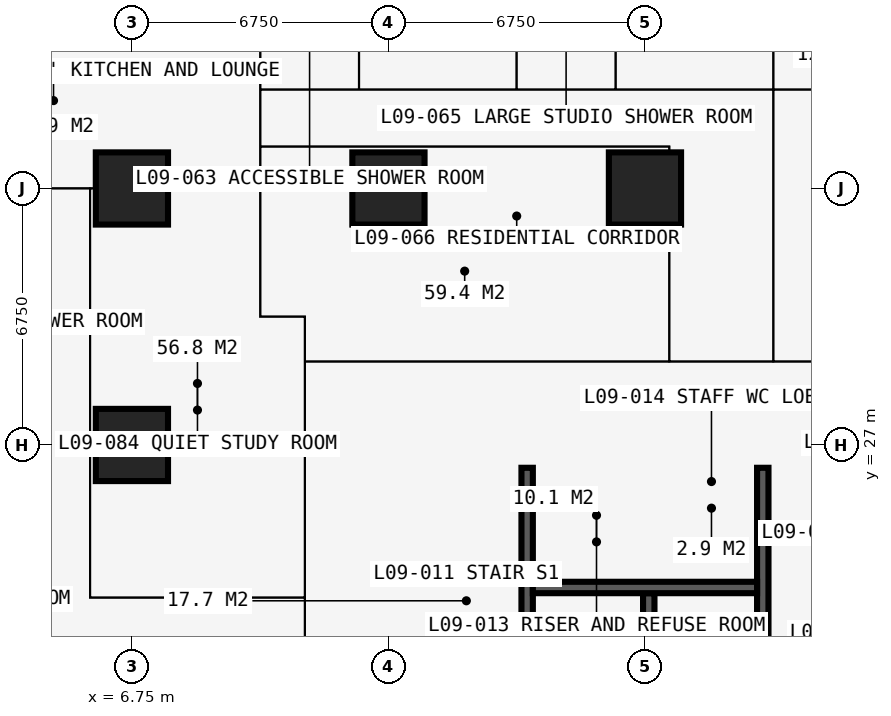
"""IFC4 building model, lengths in metres.
Left out: names, types, materials, properties, quantities, classifications, styles, units other than length and angle.
Written with IfcOpenShell. Run it as: python <this file> out.ifc"""

import sys

from ifc_helpers import new_model, si_unit, direction, frame, frame_2d, origin, origin_2d, place, context, subcontext, project, spatial, rectangle, extrude, element, fill, save


model = new_model("IFC4")
c1 = context("Model", 3, precision=1e-05, world=origin(), true_north=direction((0.0, 1.0)))
c2 = subcontext(c1, "Body", "Model", "MODEL_VIEW")
j1 = project(units=[si_unit("LENGTHUNIT", "METRE"), si_unit("PLANEANGLEUNIT", "RADIAN")], contexts=[c1])
p1 = place(None, origin())
s1 = spatial("IfcSite", under=j1, at=p1, CompositionType="ELEMENT")
p2 = place(p1, origin())
s2 = spatial("IfcBuilding", under=s1, at=p2, CompositionType="ELEMENT")
p3 = place(p2, frame((0.0, 0.0, 36.0)))
s3 = spatial("IfcBuildingStorey", under=s2, at=p3, CompositionType="ELEMENT", Elevation=36.0)
for number, where, z_axis, x_axis in (
    (1, (6.75, 27.0, 0.0), (0.0, 0.0, 1.0), (1.0, 0.0, 0.0)),
    (2, (6.75, 33.75, 0.0), (0.0, 0.0, 1.0), (1.0, 0.0, 0.0)),
    (3, (13.5, 33.75, 0.0), (0.0, 0.0, 1.0), (1.0, 0.0, 0.0)),
    (4, (20.25, 33.75, 0.0), (0.0, 0.0, 1.0), (1.0, 0.0, 0.0)),
):
    element("IfcColumn", number, at=place(p3, frame(where, z_axis=z_axis, x_axis=x_axis)), inside=s3, PredefinedType="COLUMN", context=c2, shape_type="SweptSolid", body=[
        extrude(rectangle(XDim=1.9, YDim=1.9, at=origin_2d()), origin(), (0.0, 0.0, 1.0), 3.6),
    ])
p4 = place(p3, frame((27.6, 27.0, 0.0), z_axis=(0.0, 0.0, 1.0), x_axis=(-1.0, 0.0, 0.0)))
e5 = element("IfcWall", 5, at=p4, inside=s3, PredefinedType="SHEAR", context=c2, shape_type="SweptSolid", body=[
    extrude(rectangle(XDim=14.7, YDim=1.2, at=frame_2d((7.35, 0.0))), origin(), (0.0, 0.0, 1.0), 3.6),
])
p5 = place(p4, frame((4.55, 0.0, 0.0)))
e6 = element("IfcOpeningElement", 6, at=p5, cuts=e5, PredefinedType="OPENING", context=c2, shape_type="SweptSolid", body=[
    extrude(rectangle(XDim=0.9, YDim=2.2, at=frame_2d((0.45, 1.1))), frame((0.0, 0.61, 0.0), z_axis=(0.0, -1.0, 0.0), x_axis=(1.0, 0.0, 0.0)), (0.0, 0.0, 1.0), 1.22),
])
p6 = place(p4, frame((7.525, 0.0, 0.0)))
e7 = element("IfcOpeningElement", 7, at=p6, cuts=e5, PredefinedType="OPENING", context=c2, shape_type="SweptSolid", body=[
    extrude(rectangle(XDim=1.0, YDim=2.2, at=frame_2d((0.5, 1.1))), frame((0.0, 0.61, 0.0), z_axis=(0.0, -1.0, 0.0), x_axis=(1.0, 0.0, 0.0)), (0.0, 0.0, 1.0), 1.22),
])
p7 = place(p3, frame((13.5, 26.4, 0.0), z_axis=(0.0, 0.0, 1.0), x_axis=(0.0, -1.0, 0.0)))
e8 = element("IfcWall", 8, at=p7, inside=s3, PredefinedType="SHEAR", context=c2, shape_type="SweptSolid", body=[
    extrude(rectangle(XDim=12.3, YDim=1.2, at=frame_2d((6.15, 0.0))), origin(), (0.0, 0.0, 1.0), 3.6),
])
p8 = place(p7, frame((7.45, 0.0, 0.0)))
e9 = element("IfcOpeningElement", 9, at=p8, cuts=e8, PredefinedType="OPENING", context=c2, shape_type="SweptSolid", body=[
    extrude(rectangle(XDim=1.2, YDim=2.2, at=frame_2d((0.6, 1.1))), frame((0.0, 0.61, 0.0), z_axis=(0.0, -1.0, 0.0), x_axis=(1.0, 0.0, 0.0)), (0.0, 0.0, 1.0), 1.22),
])
for number, where, z_axis, x_axis in (
    (10, (17.15, 20.3, 0.0), (0.0, 0.0, 1.0), (0.0, 1.0, 0.0)),
    (11, (23.35, 20.3, 0.0), (0.0, 0.0, 1.0), (0.0, 1.0, 0.0)),
):
    element("IfcWall", number, at=place(p3, frame(where, z_axis=z_axis, x_axis=x_axis)), inside=s3, PredefinedType="SHEAR", context=c2, shape_type="SweptSolid", body=[
        extrude(rectangle(XDim=6.1, YDim=0.3, at=frame_2d((3.05, 0.0))), origin(), (0.0, 0.0, 1.0), 3.6),
    ])
p9 = place(p3, frame((20.35, 20.3, 0.0), z_axis=(0.0, 0.0, 1.0), x_axis=(0.0, 1.0, 0.0)))
e12 = element("IfcWall", 12, at=p9, inside=s3, PredefinedType="SHEAR", context=c2, shape_type="SweptSolid", body=[
    extrude(rectangle(XDim=2.8, YDim=0.3, at=frame_2d((1.4, 0.0))), origin(), (0.0, 0.0, 1.0), 3.6),
])
p10 = place(p3, frame((17.3, 23.25, 0.0), z_axis=(0.0, 0.0, 1.0), x_axis=(1.0, 0.0, 0.0)))
e13 = element("IfcWall", 13, at=p10, inside=s3, PredefinedType="SHEAR", context=c2, shape_type="SweptSolid", body=[
    extrude(rectangle(XDim=5.9, YDim=0.3, at=frame_2d((2.95, 0.0))), origin(), (0.0, 0.0, 1.0), 3.6),
])
p11 = place(p3, frame((20.725, 23.4, 0.0), z_axis=(0.0, 0.0, 1.0), x_axis=(0.0, 1.0, 0.0)))
e14 = element("IfcWall", 14, at=p11, inside=s3, PredefinedType="PARTITIONING", context=c2, shape_type="SweptSolid", body=[
    extrude(rectangle(XDim=3.0, YDim=0.15, at=frame_2d((1.5, 0.0))), origin(), (0.0, 0.0, 1.0), 3.375),
])
p12 = place(p3, frame((20.8, 25.1, 0.0), z_axis=(0.0, 0.0, 1.0), x_axis=(1.0, 0.0, 0.0)))
e15 = element("IfcWall", 15, at=p12, inside=s3, PredefinedType="PARTITIONING", context=c2, shape_type="SweptSolid", body=[
    extrude(rectangle(XDim=2.4, YDim=0.15, at=frame_2d((1.2, 0.0))), origin(), (0.0, 0.0, 1.0), 3.375),
])
p13 = place(p12, frame((0.75, 0.0, 0.0)))
e16 = element("IfcOpeningElement", 16, at=p13, cuts=e15, PredefinedType="OPENING", context=c2, shape_type="SweptSolid", body=[
    extrude(rectangle(XDim=0.9, YDim=2.2, at=frame_2d((0.45, 1.1))), frame((0.0, 0.085, 0.0), z_axis=(0.0, -1.0, 0.0), x_axis=(1.0, 0.0, 0.0)), (0.0, 0.0, 1.0), 0.17),
])
p14 = place(p3, frame((4.15, 33.75, 0.0), z_axis=(0.0, 0.0, 1.0), x_axis=(1.0, 0.0, 0.0)))
e17 = element("IfcWall", 17, at=p14, inside=s3, PredefinedType="PARTITIONING", context=c2, shape_type="SweptSolid", body=[
    extrude(rectangle(XDim=5.975, YDim=0.15, at=frame_2d((2.988, 0.0))), origin(), (0.0, 0.0, 1.0), 2.877),
])
p15 = place(p3, frame((5.65, 22.988, 0.0), z_axis=(0.0, 0.0, 1.0), x_axis=(0.0, 1.0, 0.0)))
e18 = element("IfcWall", 18, at=p15, inside=s3, PredefinedType="PARTITIONING", context=c2, shape_type="SweptSolid", body=[
    extrude(rectangle(XDim=10.762, YDim=0.15, at=frame_2d((5.381, 0.0))), origin(), (0.0, 0.0, 1.0), 3.375),
])
p16 = place(p15, frame((5.0, 0.0, 0.0)))
e19 = element("IfcOpeningElement", 19, at=p16, cuts=e18, PredefinedType="OPENING", context=c2, shape_type="SweptSolid", body=[
    extrude(rectangle(XDim=0.95, YDim=2.2, at=frame_2d((0.475, 1.1))), frame((0.0, 0.085, 0.0), z_axis=(0.0, -1.0, 0.0), x_axis=(1.0, 0.0, 0.0)), (0.0, 0.0, 1.0), 0.17),
])
p17 = place(p3, frame((5.65, 22.988, 0.0), z_axis=(0.0, 0.0, 1.0), x_axis=(1.0, 0.0, 0.0)))
e20 = element("IfcWall", 20, at=p17, inside=s3, PredefinedType="PARTITIONING", context=c2, shape_type="SweptSolid", body=[
    extrude(rectangle(XDim=5.65, YDim=0.15, at=frame_2d((2.825, 0.0))), origin(), (0.0, 0.0, 1.0), 3.375),
])
p18 = place(p3, frame((10.125, 30.375, 0.0), z_axis=(0.0, 0.0, 1.0), x_axis=(0.0, 1.0, 0.0)))
e21 = element("IfcWall", 21, at=p18, inside=s3, PredefinedType="PARTITIONING", context=c2, shape_type="SweptSolid", body=[
    extrude(rectangle(XDim=10.859, YDim=0.15, at=frame_2d((5.429, 0.0))), origin(), (0.0, 0.0, 1.0), 3.375),
])
p19 = place(p18, frame((4.725, 0.0, 0.0)))
e22 = element("IfcOpeningElement", 22, at=p19, cuts=e21, PredefinedType="OPENING", context=c2, shape_type="SweptSolid", body=[
    extrude(rectangle(XDim=1.0, YDim=2.2, at=frame_2d((0.5, 1.1))), frame((0.0, 0.085, 0.0), z_axis=(0.0, -1.0, 0.0), x_axis=(1.0, 0.0, 0.0)), (0.0, 0.0, 1.0), 0.17),
])
p20 = place(p3, frame((10.125, 30.375, 0.0), z_axis=(0.0, 0.0, 1.0), x_axis=(1.0, 0.0, 0.0)))
e23 = element("IfcWall", 23, at=p20, inside=s3, PredefinedType="PARTITIONING", context=c2, shape_type="SweptSolid", body=[
    extrude(rectangle(XDim=1.175, YDim=0.15, at=frame_2d((0.587, 0.0))), origin(), (0.0, 0.0, 1.0), 3.375),
])
p21 = place(p3, frame((10.125, 34.85, 0.0), z_axis=(0.0, 0.0, 1.0), x_axis=(1.0, 0.0, 0.0)))
e24 = element("IfcWall", 24, at=p21, inside=s3, PredefinedType="PARTITIONING", context=c2, shape_type="SweptSolid", body=[
    extrude(rectangle(XDim=10.762, YDim=0.15, at=frame_2d((5.381, 0.0))), origin(), (0.0, 0.0, 1.0), 3.375),
])
p22 = place(p21, frame((4.9, 0.0, 0.0)))
e25 = element("IfcOpeningElement", 25, at=p22, cuts=e24, PredefinedType="OPENING", context=c2, shape_type="SweptSolid", body=[
    extrude(rectangle(XDim=0.95, YDim=2.2, at=frame_2d((0.475, 1.1))), frame((0.0, 0.085, 0.0), z_axis=(0.0, -1.0, 0.0), x_axis=(1.0, 0.0, 0.0)), (0.0, 0.0, 1.0), 0.17),
])
p23 = place(p3, frame((10.125, 36.35, 0.0), z_axis=(0.0, 0.0, 1.0), x_axis=(1.0, 0.0, 0.0)))
e26 = element("IfcWall", 26, at=p23, inside=s3, PredefinedType="PARTITIONING", context=c2, shape_type="SweptSolid", body=[
    extrude(rectangle(XDim=23.625, YDim=0.15, at=frame_2d((11.812, 0.0))), origin(), (0.0, 0.0, 1.0), 3.375),
])
p24 = place(p23, frame((20.5, 0.0, 0.0)))
e27 = element("IfcOpeningElement", 27, at=p24, cuts=e26, PredefinedType="OPENING", context=c2, shape_type="SweptSolid", body=[
    extrude(rectangle(XDim=0.95, YDim=2.2, at=frame_2d((0.475, 1.1))), frame((0.0, 0.085, 0.0), z_axis=(0.0, -1.0, 0.0), x_axis=(1.0, 0.0, 0.0)), (0.0, 0.0, 1.0), 0.17),
])
p25 = place(p23, frame((17.125, 0.0, 0.0)))
e28 = element("IfcOpeningElement", 28, at=p25, cuts=e26, PredefinedType="OPENING", context=c2, shape_type="SweptSolid", body=[
    extrude(rectangle(XDim=0.95, YDim=2.2, at=frame_2d((0.475, 1.1))), frame((0.0, 0.085, 0.0), z_axis=(0.0, -1.0, 0.0), x_axis=(1.0, 0.0, 0.0)), (0.0, 0.0, 1.0), 0.17),
])
p26 = place(p23, frame((13.7, 0.0, 0.0)))
e29 = element("IfcOpeningElement", 29, at=p26, cuts=e26, PredefinedType="OPENING", context=c2, shape_type="SweptSolid", body=[
    extrude(rectangle(XDim=0.95, YDim=2.2, at=frame_2d((0.475, 1.1))), frame((0.0, 0.085, 0.0), z_axis=(0.0, -1.0, 0.0), x_axis=(1.0, 0.0, 0.0)), (0.0, 0.0, 1.0), 0.17),
])
p27 = place(p23, frame((4.2, 0.0, 0.0)))
e30 = element("IfcOpeningElement", 30, at=p27, cuts=e26, PredefinedType="OPENING", context=c2, shape_type="SweptSolid", body=[
    extrude(rectangle(XDim=0.95, YDim=2.2, at=frame_2d((0.475, 1.1))), frame((0.0, 0.085, 0.0), z_axis=(0.0, -1.0, 0.0), x_axis=(1.0, 0.0, 0.0)), (0.0, 0.0, 1.0), 0.17),
])
p28 = place(p23, frame((10.95, 0.0, 0.0)))
e31 = element("IfcOpeningElement", 31, at=p28, cuts=e26, PredefinedType="OPENING", context=c2, shape_type="SweptSolid", body=[
    extrude(rectangle(XDim=0.95, YDim=2.2, at=frame_2d((0.475, 1.1))), frame((0.0, 0.085, 0.0), z_axis=(0.0, -1.0, 0.0), x_axis=(1.0, 0.0, 0.0)), (0.0, 0.0, 1.0), 0.17),
])
p29 = place(p3, frame((11.3, 11.3, 0.0), z_axis=(0.0, 0.0, 1.0), x_axis=(0.0, 1.0, 0.0)))
e32 = element("IfcWall", 32, at=p29, inside=s3, PredefinedType="PARTITIONING", context=c2, shape_type="SweptSolid", body=[
    extrude(rectangle(XDim=19.075, YDim=0.15, at=frame_2d((9.538, 0.0))), origin(), (0.0, 0.0, 1.0), 3.375),
])
p30 = place(p29, frame((10.137, 0.0, 0.0)))
e33 = element("IfcOpeningElement", 33, at=p30, cuts=e32, PredefinedType="OPENING", context=c2, shape_type="SweptSolid", body=[
    extrude(rectangle(XDim=1.0, YDim=2.2, at=frame_2d((0.5, 1.1))), frame((0.0, 0.085, 0.0), z_axis=(0.0, -1.0, 0.0), x_axis=(1.0, 0.0, 0.0)), (0.0, 0.0, 1.0), 0.17),
])
p31 = place(p3, frame((11.3, 29.2, 0.0), z_axis=(0.0, 0.0, 1.0), x_axis=(1.0, 0.0, 0.0)))
e34 = element("IfcWall", 34, at=p31, inside=s3, PredefinedType="PARTITIONING", context=c2, shape_type="SweptSolid", body=[
    extrude(rectangle(XDim=19.075, YDim=0.15, at=frame_2d((9.538, 0.0))), origin(), (0.0, 0.0, 1.0), 3.375),
])
p32 = place(p31, frame((12.875, 0.0, 0.0)))
e35 = element("IfcOpeningElement", 35, at=p32, cuts=e34, PredefinedType="OPENING", context=c2, shape_type="SweptSolid", body=[
    extrude(rectangle(XDim=1.0, YDim=2.2, at=frame_2d((0.5, 1.1))), frame((0.0, 0.085, 0.0), z_axis=(0.0, -1.0, 0.0), x_axis=(1.0, 0.0, 0.0)), (0.0, 0.0, 1.0), 0.17),
])
p33 = place(p31, frame((10.438, 0.0, 0.0)))
e36 = element("IfcOpeningElement", 36, at=p33, cuts=e34, PredefinedType="OPENING", context=c2, shape_type="SweptSolid", body=[
    extrude(rectangle(XDim=1.0, YDim=2.2, at=frame_2d((0.5, 1.1))), frame((0.0, 0.085, 0.0), z_axis=(0.0, -1.0, 0.0), x_axis=(1.0, 0.0, 0.0)), (0.0, 0.0, 1.0), 0.17),
])
p34 = place(p31, frame((14.875, 0.0, 0.0)))
e37 = element("IfcOpeningElement", 37, at=p34, cuts=e34, PredefinedType="OPENING", context=c2, shape_type="SweptSolid", body=[
    extrude(rectangle(XDim=0.95, YDim=2.2, at=frame_2d((0.475, 1.1))), frame((0.0, 0.085, 0.0), z_axis=(0.0, -1.0, 0.0), x_axis=(1.0, 0.0, 0.0)), (0.0, 0.0, 1.0), 0.17),
])
p35 = place(p3, frame((12.725, 36.35, 0.0), z_axis=(0.0, 0.0, 1.0), x_axis=(0.0, 1.0, 0.0)))
e38 = element("IfcWall", 38, at=p35, inside=s3, PredefinedType="PARTITIONING", context=c2, shape_type="SweptSolid", body=[
    extrude(rectangle(XDim=2.4, YDim=0.1, at=frame_2d((1.2, 0.0))), origin(), (0.0, 0.0, 1.0), 3.375),
])
p36 = place(p3, frame((16.875, 36.35, 0.0), z_axis=(0.0, 0.0, 1.0), x_axis=(0.0, 1.0, 0.0)))
e39 = element("IfcWall", 39, at=p36, inside=s3, PredefinedType="PARTITIONING", context=c2, shape_type="SweptSolid", body=[
    extrude(rectangle(XDim=4.884, YDim=0.175, at=frame_2d((2.442, 0.0))), origin(), (0.0, 0.0, 1.0), 3.375),
])
p37 = place(p36, frame((0.75, 0.0, 0.0)))
e40 = element("IfcOpeningElement", 40, at=p37, cuts=e39, PredefinedType="OPENING", context=c2, shape_type="SweptSolid", body=[
    extrude(rectangle(XDim=0.9, YDim=2.2, at=frame_2d((0.45, 1.1))), frame((0.0, 0.097, 0.0), z_axis=(0.0, -1.0, 0.0), x_axis=(1.0, 0.0, 0.0)), (0.0, 0.0, 1.0), 0.195),
])
p38 = place(p3, frame((19.475, 36.35, 0.0), z_axis=(0.0, 0.0, 1.0), x_axis=(0.0, 1.0, 0.0)))
e41 = element("IfcWall", 41, at=p38, inside=s3, PredefinedType="PARTITIONING", context=c2, shape_type="SweptSolid", body=[
    extrude(rectangle(XDim=2.4, YDim=0.1, at=frame_2d((1.2, 0.0))), origin(), (0.0, 0.0, 1.0), 3.375),
])
p39 = place(p3, frame((20.887, 29.2, 0.0), z_axis=(0.0, 0.0, 1.0), x_axis=(0.0, 1.0, 0.0)))
e42 = element("IfcWall", 42, at=p39, inside=s3, PredefinedType="PARTITIONING", context=c2, shape_type="SweptSolid", body=[
    extrude(rectangle(XDim=5.65, YDim=0.15, at=frame_2d((2.825, 0.0))), origin(), (0.0, 0.0, 1.0), 3.375),
])
p40 = place(p3, frame((23.625, 29.2, 0.0), z_axis=(0.0, 0.0, 1.0), x_axis=(0.0, 1.0, 0.0)))
e43 = element("IfcWall", 43, at=p40, inside=s3, PredefinedType="PARTITIONING", context=c2, shape_type="SweptSolid", body=[
    extrude(rectangle(XDim=12.034, YDim=0.15, at=frame_2d((6.017, 0.0))), origin(), (0.0, 0.0, 1.0), 3.375),
])
p41 = place(p13, origin())
e44 = element("IfcDoor", 44, at=p41, inside=s3, OperationType="SINGLE_SWING_RIGHT", PredefinedType="DOOR", context=c2, shape_type="SweptSolid", body=[
    extrude(rectangle(XDim=0.9, YDim=2.2, at=frame_2d((0.45, 1.1))), frame((0.0, 0.025, 0.0), z_axis=(0.0, -1.0, 0.0), x_axis=(1.0, 0.0, 0.0)), (0.0, 0.0, 1.0), 0.05),
])
fill(e16, e44)
p42 = place(p5, origin())
e45 = element("IfcDoor", 45, at=p42, inside=s3, OperationType="SINGLE_SWING_LEFT", PredefinedType="DOOR", context=c2, shape_type="SweptSolid", body=[
    extrude(rectangle(XDim=0.9, YDim=2.2, at=frame_2d((0.45, 1.1))), frame((0.0, 0.4, 0.0), z_axis=(0.0, -1.0, 0.0), x_axis=(1.0, 0.0, 0.0)), (0.0, 0.0, 1.0), 0.8),
])
fill(e6, e45)
p43 = place(p6, origin())
e46 = element("IfcDoor", 46, at=p43, inside=s3, OperationType="SINGLE_SWING_LEFT", PredefinedType="DOOR", context=c2, shape_type="SweptSolid", body=[
    extrude(rectangle(XDim=1.0, YDim=2.2, at=frame_2d((0.5, 1.1))), frame((0.0, 0.025, 0.0), z_axis=(0.0, -1.0, 0.0), x_axis=(1.0, 0.0, 0.0)), (0.0, 0.0, 1.0), 0.05),
])
fill(e7, e46)
p44 = place(p26, origin())
e47 = element("IfcDoor", 47, at=p44, inside=s3, OperationType="SINGLE_SWING_LEFT", PredefinedType="DOOR", context=c2, shape_type="SweptSolid", body=[
    extrude(rectangle(XDim=0.95, YDim=2.2, at=frame_2d((0.475, 1.1))), frame((0.0, 0.025, 0.0), z_axis=(0.0, -1.0, 0.0), x_axis=(1.0, 0.0, 0.0)), (0.0, 0.0, 1.0), 0.05),
])
fill(e29, e47)
p45 = place(p32, origin())
e48 = element("IfcDoor", 48, at=p45, inside=s3, OperationType="SINGLE_SWING_LEFT", PredefinedType="DOOR", context=c2, shape_type="SweptSolid", body=[
    extrude(rectangle(XDim=1.0, YDim=2.2, at=frame_2d((0.5, 1.1))), frame((0.0, 0.025, 0.0), z_axis=(0.0, -1.0, 0.0), x_axis=(1.0, 0.0, 0.0)), (0.0, 0.0, 1.0), 0.05),
])
fill(e35, e48)
p46 = place(p27, origin())
e49 = element("IfcDoor", 49, at=p46, inside=s3, OperationType="SINGLE_SWING_LEFT", PredefinedType="DOOR", context=c2, shape_type="SweptSolid", body=[
    extrude(rectangle(XDim=0.95, YDim=2.2, at=frame_2d((0.475, 1.1))), frame((0.0, 0.025, 0.0), z_axis=(0.0, -1.0, 0.0), x_axis=(1.0, 0.0, 0.0)), (0.0, 0.0, 1.0), 0.05),
])
fill(e30, e49)
p47 = place(p28, origin())
e50 = element("IfcDoor", 50, at=p47, inside=s3, OperationType="SINGLE_SWING_LEFT", PredefinedType="DOOR", context=c2, shape_type="SweptSolid", body=[
    extrude(rectangle(XDim=0.95, YDim=2.2, at=frame_2d((0.475, 1.1))), frame((0.0, 0.025, 0.0), z_axis=(0.0, -1.0, 0.0), x_axis=(1.0, 0.0, 0.0)), (0.0, 0.0, 1.0), 0.05),
])
fill(e31, e50)
p48 = place(p37, origin())
e51 = element("IfcDoor", 51, at=p48, inside=s3, OperationType="SINGLE_SWING_RIGHT", PredefinedType="DOOR", context=c2, shape_type="SweptSolid", body=[
    extrude(rectangle(XDim=0.9, YDim=2.2, at=frame_2d((0.45, 1.1))), frame((0.0, 0.025, 0.0), z_axis=(0.0, -1.0, 0.0), x_axis=(1.0, 0.0, 0.0)), (0.0, 0.0, 1.0), 0.05),
])
fill(e40, e51)
p49 = place(p33, origin())
e52 = element("IfcDoor", 52, at=p49, inside=s3, OperationType="SINGLE_SWING_LEFT", PredefinedType="DOOR", context=c2, shape_type="SweptSolid", body=[
    extrude(rectangle(XDim=1.0, YDim=2.2, at=frame_2d((0.5, 1.1))), frame((0.0, 0.025, 0.0), z_axis=(0.0, -1.0, 0.0), x_axis=(1.0, 0.0, 0.0)), (0.0, 0.0, 1.0), 0.05),
])
fill(e36, e52)
p50 = place(p22, origin())
e53 = element("IfcDoor", 53, at=p50, inside=s3, OperationType="SINGLE_SWING_LEFT", PredefinedType="DOOR", context=c2, shape_type="SweptSolid", body=[
    extrude(rectangle(XDim=0.95, YDim=2.2, at=frame_2d((0.475, 1.1))), frame((0.0, 0.025, 0.0), z_axis=(0.0, -1.0, 0.0), x_axis=(1.0, 0.0, 0.0)), (0.0, 0.0, 1.0), 0.05),
])
fill(e25, e53)
p51 = place(p19, origin())
e54 = element("IfcDoor", 54, at=p51, inside=s3, OperationType="SINGLE_SWING_LEFT", PredefinedType="DOOR", context=c2, shape_type="SweptSolid", body=[
    extrude(rectangle(XDim=1.0, YDim=2.2, at=frame_2d((0.5, 1.1))), frame((0.0, 0.025, 0.0), z_axis=(0.0, -1.0, 0.0), x_axis=(1.0, 0.0, 0.0)), (0.0, 0.0, 1.0), 0.05),
])
fill(e22, e54)
p52 = place(p30, origin())
e55 = element("IfcDoor", 55, at=p52, inside=s3, OperationType="SINGLE_SWING_LEFT", PredefinedType="DOOR", context=c2, shape_type="SweptSolid", body=[
    extrude(rectangle(XDim=1.0, YDim=2.2, at=frame_2d((0.5, 1.1))), frame((0.0, 0.025, 0.0), z_axis=(0.0, -1.0, 0.0), x_axis=(1.0, 0.0, 0.0)), (0.0, 0.0, 1.0), 0.05),
])
fill(e33, e55)
p53 = place(p16, origin())
e56 = element("IfcDoor", 56, at=p53, inside=s3, OperationType="SINGLE_SWING_LEFT", PredefinedType="DOOR", context=c2, shape_type="SweptSolid", body=[
    extrude(rectangle(XDim=0.95, YDim=2.2, at=frame_2d((0.475, 1.1))), frame((0.0, 0.025, 0.0), z_axis=(0.0, -1.0, 0.0), x_axis=(1.0, 0.0, 0.0)), (0.0, 0.0, 1.0), 0.05),
])
fill(e19, e56)
save(model, sys.argv[1])
